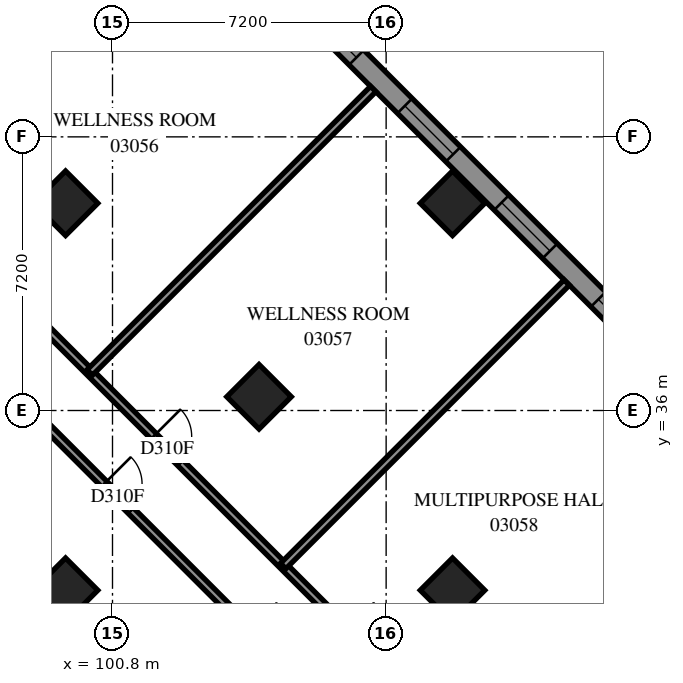
"""IFC4 building model, lengths in metres.
Left out: names, types, materials, properties, quantities, classifications, styles, units other than length and angle.
Written with IfcOpenShell. Run it as: python <this file> out.ifc"""

import sys

from ifc_helpers import new_model, si_unit, direction, frame, frame_2d, origin, origin_2d, place, context, subcontext, project, spatial, polyline, rectangle, outline, extrude, element, fill, save


model = new_model("IFC4")
c1 = context("Model", 3, precision=1e-05, world=origin(), true_north=direction((0.0, 1.0)))
c2 = subcontext(c1, "Body", "Model", "MODEL_VIEW")
j1 = project(units=[si_unit("LENGTHUNIT", "METRE"), si_unit("PLANEANGLEUNIT", "RADIAN")], contexts=[c1])
p1 = place(None, origin())
s1 = spatial("IfcSite", under=j1, at=p1, CompositionType="ELEMENT")
p2 = place(p1, origin())
s2 = spatial("IfcBuilding", under=s1, at=p2, CompositionType="ELEMENT")
p3 = place(p2, frame((0.0, 0.0, 14.4)))
s3 = spatial("IfcBuildingStorey", under=s2, at=p3, CompositionType="ELEMENT", Elevation=14.4)
for number, where, z_axis, x_axis in (
    (1, (99.565, 41.453, 0.0), (0.0, 0.0, 1.0), (0.707, -0.707, 0.0)),
    (2, (109.747, 41.453, 0.0), (0.0, 0.0, 1.0), (0.707, -0.707, 0.0)),
    (3, (104.656, 36.362, 0.0), (0.0, 0.0, 1.0), (0.707, -0.707, 0.0)),
    (4, (99.565, 31.271, 0.0), (0.0, 0.0, 1.0), (0.707, -0.707, 0.0)),
    (5, (109.747, 31.271, 0.0), (0.0, 0.0, 1.0), (0.707, -0.707, 0.0)),
):
    element("IfcColumn", number, at=place(p3, frame(where, z_axis=z_axis, x_axis=x_axis)), inside=s3, PredefinedType="COLUMN", context=c2, shape_type="SweptSolid", body=[
        extrude(rectangle(XDim=1.2, YDim=1.2, at=origin_2d()), origin(), (0.0, 0.0, 1.0), 3.8),
    ])
p4 = place(p3, frame((117.843, 34.665, 0.0), z_axis=(0.0, 0.0, 1.0), x_axis=(-0.7071067812, 0.7071067812, 0.0)))
e6 = element("IfcWall", 6, at=p4, inside=s3, PredefinedType="SOLIDWALL", context=c2, shape_type="SweptSolid", body=[
    extrude(outline(polyline([(-0.275, -0.275), (54.222, -0.275), (53.994, 0.275), (0.275, 0.275), (-0.275, -0.275)])), origin(), (0.0, 0.0, 1.0), 3.8),
])
p5 = place(p4, frame((0.8, 0.0, 0.7)))
e7 = element("IfcOpeningElement", 7, at=p5, cuts=e6, PredefinedType="OPENING", context=c2, shape_type="SweptSolid", body=[
    extrude(rectangle(XDim=1.8, YDim=2.6, at=frame_2d((0.9, 1.3))), frame((0.0, 0.285, 0.0), z_axis=(0.0, -1.0, 0.0), x_axis=(1.0, 0.0, 0.0)), (0.0, 0.0, 1.0), 0.57),
])
p6 = place(p4, frame((4.225, 0.0, 0.7)))
e8 = element("IfcOpeningElement", 8, at=p6, cuts=e6, PredefinedType="OPENING", context=c2, shape_type="SweptSolid", body=[
    extrude(rectangle(XDim=1.8, YDim=2.6, at=frame_2d((0.9, 1.3))), frame((0.0, 0.285, 0.0), z_axis=(0.0, -1.0, 0.0), x_axis=(1.0, 0.0, 0.0)), (0.0, 0.0, 1.0), 0.57),
])
p7 = place(p4, frame((7.825, 0.0, 0.7)))
e9 = element("IfcOpeningElement", 9, at=p7, cuts=e6, PredefinedType="OPENING", context=c2, shape_type="SweptSolid", body=[
    extrude(rectangle(XDim=1.8, YDim=2.6, at=frame_2d((0.9, 1.3))), frame((0.0, 0.285, 0.0), z_axis=(0.0, -1.0, 0.0), x_axis=(1.0, 0.0, 0.0)), (0.0, 0.0, 1.0), 0.57),
])
p8 = place(p4, frame((11.425, 0.0, 0.7)))
e10 = element("IfcOpeningElement", 10, at=p8, cuts=e6, PredefinedType="OPENING", context=c2, shape_type="SweptSolid", body=[
    extrude(rectangle(XDim=1.8, YDim=2.6, at=frame_2d((0.9, 1.3))), frame((0.0, 0.285, 0.0), z_axis=(0.0, -1.0, 0.0), x_axis=(1.0, 0.0, 0.0)), (0.0, 0.0, 1.0), 0.57),
])
p9 = place(p4, frame((15.025, 0.0, 0.7)))
e11 = element("IfcOpeningElement", 11, at=p9, cuts=e6, PredefinedType="OPENING", context=c2, shape_type="SweptSolid", body=[
    extrude(rectangle(XDim=1.8, YDim=2.6, at=frame_2d((0.9, 1.3))), frame((0.0, 0.285, 0.0), z_axis=(0.0, -1.0, 0.0), x_axis=(1.0, 0.0, 0.0)), (0.0, 0.0, 1.0), 0.57),
])
p10 = place(p4, frame((18.625, 0.0, 0.7)))
e12 = element("IfcOpeningElement", 12, at=p10, cuts=e6, PredefinedType="OPENING", context=c2, shape_type="SweptSolid", body=[
    extrude(rectangle(XDim=1.8, YDim=2.6, at=frame_2d((0.9, 1.3))), frame((0.0, 0.285, 0.0), z_axis=(0.0, -1.0, 0.0), x_axis=(1.0, 0.0, 0.0)), (0.0, 0.0, 1.0), 0.57),
])
p11 = place(p4, frame((22.225, 0.0, 0.7)))
e13 = element("IfcOpeningElement", 13, at=p11, cuts=e6, PredefinedType="OPENING", context=c2, shape_type="SweptSolid", body=[
    extrude(rectangle(XDim=1.8, YDim=2.6, at=frame_2d((0.9, 1.3))), frame((0.0, 0.285, 0.0), z_axis=(0.0, -1.0, 0.0), x_axis=(1.0, 0.0, 0.0)), (0.0, 0.0, 1.0), 0.57),
])
p12 = place(p4, frame((25.825, 0.0, 0.7)))
e14 = element("IfcOpeningElement", 14, at=p12, cuts=e6, PredefinedType="OPENING", context=c2, shape_type="SweptSolid", body=[
    extrude(rectangle(XDim=1.8, YDim=2.6, at=frame_2d((0.9, 1.3))), frame((0.0, 0.285, 0.0), z_axis=(0.0, -1.0, 0.0), x_axis=(1.0, 0.0, 0.0)), (0.0, 0.0, 1.0), 0.57),
])
p13 = place(p4, frame((29.425, 0.0, 0.7)))
e15 = element("IfcOpeningElement", 15, at=p13, cuts=e6, PredefinedType="OPENING", context=c2, shape_type="SweptSolid", body=[
    extrude(rectangle(XDim=1.8, YDim=2.6, at=frame_2d((0.9, 1.3))), frame((0.0, 0.285, 0.0), z_axis=(0.0, -1.0, 0.0), x_axis=(1.0, 0.0, 0.0)), (0.0, 0.0, 1.0), 0.57),
])
p14 = place(p4, frame((33.025, 0.0, 0.7)))
e16 = element("IfcOpeningElement", 16, at=p14, cuts=e6, PredefinedType="OPENING", context=c2, shape_type="SweptSolid", body=[
    extrude(rectangle(XDim=1.8, YDim=2.6, at=frame_2d((0.9, 1.3))), frame((0.0, 0.285, 0.0), z_axis=(0.0, -1.0, 0.0), x_axis=(1.0, 0.0, 0.0)), (0.0, 0.0, 1.0), 0.57),
])
p15 = place(p4, frame((36.625, 0.0, 0.7)))
e17 = element("IfcOpeningElement", 17, at=p15, cuts=e6, PredefinedType="OPENING", context=c2, shape_type="SweptSolid", body=[
    extrude(rectangle(XDim=1.8, YDim=2.6, at=frame_2d((0.9, 1.3))), frame((0.0, 0.285, 0.0), z_axis=(0.0, -1.0, 0.0), x_axis=(1.0, 0.0, 0.0)), (0.0, 0.0, 1.0), 0.57),
])
p16 = place(p4, frame((40.225, 0.0, 0.7)))
e18 = element("IfcOpeningElement", 18, at=p16, cuts=e6, PredefinedType="OPENING", context=c2, shape_type="SweptSolid", body=[
    extrude(rectangle(XDim=1.8, YDim=2.6, at=frame_2d((0.9, 1.3))), frame((0.0, 0.285, 0.0), z_axis=(0.0, -1.0, 0.0), x_axis=(1.0, 0.0, 0.0)), (0.0, 0.0, 1.0), 0.57),
])
p17 = place(p4, frame((43.825, 0.0, 0.7)))
e19 = element("IfcOpeningElement", 19, at=p17, cuts=e6, PredefinedType="OPENING", context=c2, shape_type="SweptSolid", body=[
    extrude(rectangle(XDim=1.8, YDim=2.6, at=frame_2d((0.9, 1.3))), frame((0.0, 0.285, 0.0), z_axis=(0.0, -1.0, 0.0), x_axis=(1.0, 0.0, 0.0)), (0.0, 0.0, 1.0), 0.57),
])
p18 = place(p4, frame((47.425, 0.0, 0.7)))
e20 = element("IfcOpeningElement", 20, at=p18, cuts=e6, PredefinedType="OPENING", context=c2, shape_type="SweptSolid", body=[
    extrude(rectangle(XDim=1.8, YDim=2.6, at=frame_2d((0.9, 1.3))), frame((0.0, 0.285, 0.0), z_axis=(0.0, -1.0, 0.0), x_axis=(1.0, 0.0, 0.0)), (0.0, 0.0, 1.0), 0.57),
])
p19 = place(p4, frame((51.06, 0.0, 0.7)))
e21 = element("IfcOpeningElement", 21, at=p19, cuts=e6, PredefinedType="OPENING", context=c2, shape_type="SweptSolid", body=[
    extrude(rectangle(XDim=1.8, YDim=2.6, at=frame_2d((0.9, 1.3))), frame((0.0, 0.285, 0.0), z_axis=(0.0, -1.0, 0.0), x_axis=(1.0, 0.0, 0.0)), (0.0, 0.0, 1.0), 0.57),
])
p20 = place(p3, frame((77.07, 42.275, 0.0), z_axis=(0.0, 0.0, 1.0), x_axis=(0.7071067812, -0.7071067812, 0.0)))
e22 = element("IfcWall", 22, at=p20, inside=s3, PredefinedType="SOLIDWALL", context=c2, shape_type="SweptSolid", body=[
    extrude(outline(polyline([(0.114, -0.275), (39.288, -0.275), (38.737, 0.275), (-0.114, 0.275), (0.114, -0.275)])), origin(), (0.0, 0.0, 1.0), 3.8),
])
p21 = place(p20, frame((2.837, 0.0, 0.7)))
e23 = element("IfcOpeningElement", 23, at=p21, cuts=e22, PredefinedType="OPENING", context=c2, shape_type="SweptSolid", body=[
    extrude(rectangle(XDim=1.8, YDim=2.6, at=frame_2d((0.9, 1.3))), frame((0.0, 0.285, 0.0), z_axis=(0.0, -1.0, 0.0), x_axis=(1.0, 0.0, 0.0)), (0.0, 0.0, 1.0), 0.57),
])
p22 = place(p20, frame((6.588, 0.0, 0.7)))
e24 = element("IfcOpeningElement", 24, at=p22, cuts=e22, PredefinedType="OPENING", context=c2, shape_type="SweptSolid", body=[
    extrude(rectangle(XDim=1.8, YDim=2.6, at=frame_2d((0.9, 1.3))), frame((0.0, 0.285, 0.0), z_axis=(0.0, -1.0, 0.0), x_axis=(1.0, 0.0, 0.0)), (0.0, 0.0, 1.0), 0.57),
])
p23 = place(p20, frame((10.188, 0.0, 0.7)))
e25 = element("IfcOpeningElement", 25, at=p23, cuts=e22, PredefinedType="OPENING", context=c2, shape_type="SweptSolid", body=[
    extrude(rectangle(XDim=1.8, YDim=2.6, at=frame_2d((0.9, 1.3))), frame((0.0, 0.285, 0.0), z_axis=(0.0, -1.0, 0.0), x_axis=(1.0, 0.0, 0.0)), (0.0, 0.0, 1.0), 0.57),
])
p24 = place(p20, frame((13.787, 0.0, 0.7)))
e26 = element("IfcOpeningElement", 26, at=p24, cuts=e22, PredefinedType="OPENING", context=c2, shape_type="SweptSolid", body=[
    extrude(rectangle(XDim=1.8, YDim=2.6, at=frame_2d((0.9, 1.3))), frame((0.0, 0.285, 0.0), z_axis=(0.0, -1.0, 0.0), x_axis=(1.0, 0.0, 0.0)), (0.0, 0.0, 1.0), 0.57),
])
p25 = place(p20, frame((17.387, 0.0, 0.7)))
e27 = element("IfcOpeningElement", 27, at=p25, cuts=e22, PredefinedType="OPENING", context=c2, shape_type="SweptSolid", body=[
    extrude(rectangle(XDim=1.8, YDim=2.6, at=frame_2d((0.9, 1.3))), frame((0.0, 0.285, 0.0), z_axis=(0.0, -1.0, 0.0), x_axis=(1.0, 0.0, 0.0)), (0.0, 0.0, 1.0), 0.57),
])
p26 = place(p20, frame((20.988, 0.0, 0.7)))
e28 = element("IfcOpeningElement", 28, at=p26, cuts=e22, PredefinedType="OPENING", context=c2, shape_type="SweptSolid", body=[
    extrude(rectangle(XDim=1.8, YDim=2.6, at=frame_2d((0.9, 1.3))), frame((0.0, 0.285, 0.0), z_axis=(0.0, -1.0, 0.0), x_axis=(1.0, 0.0, 0.0)), (0.0, 0.0, 1.0), 0.57),
])
p27 = place(p20, frame((24.587, 0.0, 0.7)))
e29 = element("IfcOpeningElement", 29, at=p27, cuts=e22, PredefinedType="OPENING", context=c2, shape_type="SweptSolid", body=[
    extrude(rectangle(XDim=1.8, YDim=2.6, at=frame_2d((0.9, 1.3))), frame((0.0, 0.285, 0.0), z_axis=(0.0, -1.0, 0.0), x_axis=(1.0, 0.0, 0.0)), (0.0, 0.0, 1.0), 0.57),
])
p28 = place(p20, frame((28.188, 0.0, 0.7)))
e30 = element("IfcOpeningElement", 30, at=p28, cuts=e22, PredefinedType="OPENING", context=c2, shape_type="SweptSolid", body=[
    extrude(rectangle(XDim=1.8, YDim=2.6, at=frame_2d((0.9, 1.3))), frame((0.0, 0.285, 0.0), z_axis=(0.0, -1.0, 0.0), x_axis=(1.0, 0.0, 0.0)), (0.0, 0.0, 1.0), 0.57),
])
p29 = place(p20, frame((31.788, 0.0, 0.7)))
e31 = element("IfcOpeningElement", 31, at=p29, cuts=e22, PredefinedType="OPENING", context=c2, shape_type="SweptSolid", body=[
    extrude(rectangle(XDim=1.8, YDim=2.6, at=frame_2d((0.9, 1.3))), frame((0.0, 0.285, 0.0), z_axis=(0.0, -1.0, 0.0), x_axis=(1.0, 0.0, 0.0)), (0.0, 0.0, 1.0), 0.57),
])
p30 = place(p20, frame((35.388, 0.0, 0.7)))
e32 = element("IfcOpeningElement", 32, at=p30, cuts=e22, PredefinedType="OPENING", context=c2, shape_type="SweptSolid", body=[
    extrude(rectangle(XDim=1.8, YDim=2.6, at=frame_2d((0.9, 1.3))), frame((0.0, 0.285, 0.0), z_axis=(0.0, -1.0, 0.0), x_axis=(1.0, 0.0, 0.0)), (0.0, 0.0, 1.0), 0.57),
])
p31 = place(p3, frame((93.835, 40.813, 0.0), z_axis=(0.0, 0.0, 1.0), x_axis=(0.7071067812, -0.7071067812, 0.0)))
e33 = element("IfcWall", 33, at=p31, inside=s3, PredefinedType="PARTITIONING", context=c2, shape_type="SweptSolid", body=[
    extrude(rectangle(XDim=25.198, YDim=0.2, at=frame_2d((12.599, 0.0))), origin(), (0.0, 0.0, 1.0), 3.8),
])
p32 = place(p31, frame((2.337, 0.0, 0.0)))
e34 = element("IfcOpeningElement", 34, at=p32, cuts=e33, PredefinedType="OPENING", context=c2, shape_type="SweptSolid", body=[
    extrude(rectangle(XDim=1.0, YDim=2.1, at=frame_2d((0.5, 1.05))), frame((0.0, 0.11, 0.0), z_axis=(0.0, -1.0, 0.0), x_axis=(1.0, 0.0, 0.0)), (0.0, 0.0, 1.0), 0.22),
])
p33 = place(p31, frame((9.537, 0.0, 0.0)))
e35 = element("IfcOpeningElement", 35, at=p33, cuts=e33, PredefinedType="OPENING", context=c2, shape_type="SweptSolid", body=[
    extrude(rectangle(XDim=1.0, YDim=2.1, at=frame_2d((0.5, 1.05))), frame((0.0, 0.11, 0.0), z_axis=(0.0, -1.0, 0.0), x_axis=(1.0, 0.0, 0.0)), (0.0, 0.0, 1.0), 0.22),
])
p34 = place(p31, frame((14.966, 0.0, 0.0)))
e36 = element("IfcOpeningElement", 36, at=p34, cuts=e33, PredefinedType="OPENING", context=c2, shape_type="SweptSolid", body=[
    extrude(rectangle(XDim=1.0, YDim=2.1, at=frame_2d((0.5, 1.05))), frame((0.0, 0.11, 0.0), z_axis=(0.0, -1.0, 0.0), x_axis=(1.0, 0.0, 0.0)), (0.0, 0.0, 1.0), 0.22),
])
p35 = place(p31, frame((21.861, 0.0, 0.0)))
e37 = element("IfcOpeningElement", 37, at=p35, cuts=e33, PredefinedType="OPENING", context=c2, shape_type="SweptSolid", body=[
    extrude(rectangle(XDim=1.0, YDim=2.1, at=frame_2d((0.5, 1.05))), frame((0.0, 0.11, 0.0), z_axis=(0.0, -1.0, 0.0), x_axis=(1.0, 0.0, 0.0)), (0.0, 0.0, 1.0), 0.22),
])
p36 = place(p3, frame((94.689, 42.517, 0.0), z_axis=(0.0, 0.0, 1.0), x_axis=(0.7071067812, -0.7071067812, 0.0)))
e38 = element("IfcWall", 38, at=p36, inside=s3, PredefinedType="PARTITIONING", context=c2, shape_type="SweptSolid", body=[
    extrude(rectangle(XDim=22.2, YDim=0.2, at=frame_2d((11.1, 0.0))), origin(), (0.0, 0.0, 1.0), 3.8),
])
p37 = place(p36, frame((2.974, 0.0, 0.0)))
e39 = element("IfcOpeningElement", 39, at=p37, cuts=e38, PredefinedType="OPENING", context=c2, shape_type="SweptSolid", body=[
    extrude(rectangle(XDim=1.0, YDim=2.1, at=frame_2d((0.5, 1.05))), frame((0.0, 0.11, 0.0), z_axis=(0.0, -1.0, 0.0), x_axis=(1.0, 0.0, 0.0)), (0.0, 0.0, 1.0), 0.22),
])
p38 = place(p36, frame((10.174, 0.0, 0.0)))
e40 = element("IfcOpeningElement", 40, at=p38, cuts=e38, PredefinedType="OPENING", context=c2, shape_type="SweptSolid", body=[
    extrude(rectangle(XDim=1.0, YDim=2.1, at=frame_2d((0.5, 1.05))), frame((0.0, 0.11, 0.0), z_axis=(0.0, -1.0, 0.0), x_axis=(1.0, 0.0, 0.0)), (0.0, 0.0, 1.0), 0.22),
])
p39 = place(p36, frame((17.374, 0.0, 0.0)))
e41 = element("IfcOpeningElement", 41, at=p39, cuts=e38, PredefinedType="OPENING", context=c2, shape_type="SweptSolid", body=[
    extrude(rectangle(XDim=1.0, YDim=2.1, at=frame_2d((0.5, 1.05))), frame((0.0, 0.11, 0.0), z_axis=(0.0, -1.0, 0.0), x_axis=(1.0, 0.0, 0.0)), (0.0, 0.0, 1.0), 0.22),
])
for number, where, z_axis, x_axis in (
    (42, (95.109, 42.091, 0.0), (0.0, 0.0, 1.0), (0.707, 0.707, 0.0)),
    (43, (105.292, 31.908, 0.0), (0.0, 0.0, 1.0), (0.707, 0.707, 0.0)),
    (44, (100.201, 36.999, 0.0), (0.0, 0.0, 1.0), (0.707, 0.707, 0.0)),
):
    element("IfcWall", number, at=place(p3, frame(where, z_axis=z_axis, x_axis=x_axis)), inside=s3, PredefinedType="PARTITIONING", context=c2, shape_type="SweptSolid", body=[
        extrude(rectangle(XDim=10.55, YDim=0.2, at=frame_2d((5.275, 0.0))), origin(), (0.0, 0.0, 1.0), 3.8),
    ])
p40 = place(p3, frame((94.544, 42.656, 0.0), z_axis=(0.0, 0.0, 1.0), x_axis=(0.7071067812, 0.7071067812, 0.0)))
e45 = element("IfcWall", 45, at=p40, inside=s3, PredefinedType="PARTITIONING", context=c2, shape_type="SweptSolid", body=[
    extrude(rectangle(XDim=9.099, YDim=0.2, at=frame_2d((4.55, 0.0))), origin(), (0.0, 0.0, 1.0), 3.8),
])
p41 = place(p3, frame((110.383, 26.817, 0.0), z_axis=(0.0, 0.0, 1.0), x_axis=(0.7071067812, 0.7071067812, 0.0)))
e46 = element("IfcWall", 46, at=p41, inside=s3, PredefinedType="PARTITIONING", context=c2, shape_type="SweptSolid", body=[
    extrude(rectangle(XDim=5.75, YDim=0.2, at=frame_2d((2.875, 0.0))), origin(), (0.0, 0.0, 1.0), 3.8),
])
p42 = place(p6, origin())
e47 = element("IfcWindow", 47, at=p42, inside=s3, PartitioningType="SINGLE_PANEL", PredefinedType="WINDOW", context=c2, shape_type="SweptSolid", body=[
    extrude(rectangle(XDim=1.8, YDim=2.6, at=frame_2d((0.9, 1.3))), frame((0.0, 0.155, 0.0), z_axis=(0.0, -1.0, 0.0), x_axis=(1.0, 0.0, 0.0)), (0.0, 0.0, 1.0), 0.06),
])
fill(e8, e47)
p43 = place(p7, origin())
e48 = element("IfcWindow", 48, at=p43, inside=s3, PartitioningType="SINGLE_PANEL", PredefinedType="WINDOW", context=c2, shape_type="SweptSolid", body=[
    extrude(rectangle(XDim=1.8, YDim=2.6, at=frame_2d((0.9, 1.3))), frame((0.0, 0.155, 0.0), z_axis=(0.0, -1.0, 0.0), x_axis=(1.0, 0.0, 0.0)), (0.0, 0.0, 1.0), 0.06),
])
fill(e9, e48)
p44 = place(p8, origin())
e49 = element("IfcWindow", 49, at=p44, inside=s3, PartitioningType="SINGLE_PANEL", PredefinedType="WINDOW", context=c2, shape_type="SweptSolid", body=[
    extrude(rectangle(XDim=1.8, YDim=2.6, at=frame_2d((0.9, 1.3))), frame((0.0, 0.155, 0.0), z_axis=(0.0, -1.0, 0.0), x_axis=(1.0, 0.0, 0.0)), (0.0, 0.0, 1.0), 0.06),
])
fill(e10, e49)
p45 = place(p9, origin())
e50 = element("IfcWindow", 50, at=p45, inside=s3, PartitioningType="SINGLE_PANEL", PredefinedType="WINDOW", context=c2, shape_type="SweptSolid", body=[
    extrude(rectangle(XDim=1.8, YDim=2.6, at=frame_2d((0.9, 1.3))), frame((0.0, 0.155, 0.0), z_axis=(0.0, -1.0, 0.0), x_axis=(1.0, 0.0, 0.0)), (0.0, 0.0, 1.0), 0.06),
])
fill(e11, e50)
p46 = place(p38, origin())
e51 = element("IfcDoor", 51, at=p46, inside=s3, OperationType="SINGLE_SWING_RIGHT", PredefinedType="DOOR", context=c2, shape_type="SweptSolid", body=[
    extrude(rectangle(XDim=1.0, YDim=2.1, at=frame_2d((0.5, 1.05))), frame((0.0, 0.025, 0.0), z_axis=(0.0, -1.0, 0.0), x_axis=(1.0, 0.0, 0.0)), (0.0, 0.0, 1.0), 0.05),
])
fill(e40, e51)
p47 = place(p33, origin())
e52 = element("IfcDoor", 52, at=p47, inside=s3, OperationType="SINGLE_SWING_LEFT", PredefinedType="DOOR", context=c2, shape_type="SweptSolid", body=[
    extrude(rectangle(XDim=1.0, YDim=2.1, at=frame_2d((0.5, 1.05))), frame((0.0, 0.025, 0.0), z_axis=(0.0, -1.0, 0.0), x_axis=(1.0, 0.0, 0.0)), (0.0, 0.0, 1.0), 0.05),
])
fill(e35, e52)
save(model, sys.argv[1])
